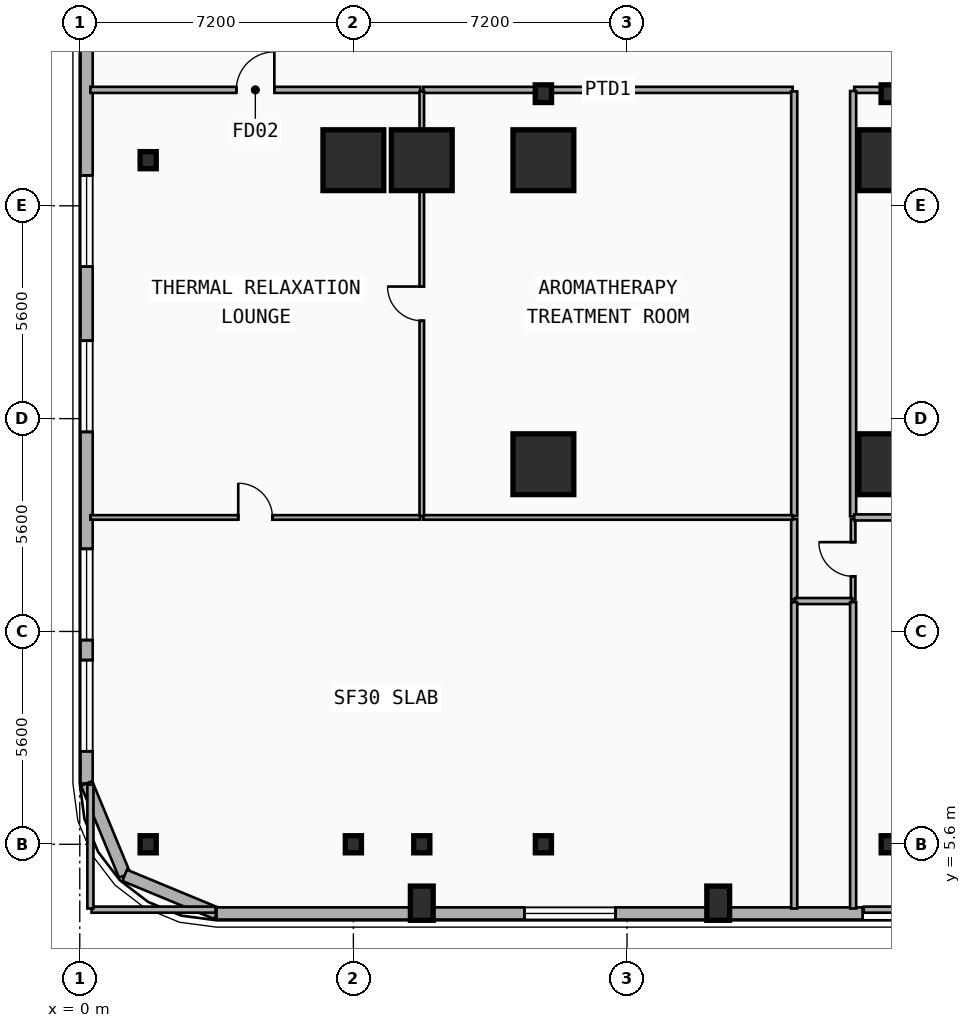
"""IFC4 building model, lengths in metres.
Left out: names, types, materials, properties, quantities, classifications, styles, units other than length and angle.
Written with IfcOpenShell. Run it as: python <this file> out.ifc"""

import sys

from ifc_helpers import new_model, si_unit, direction, frame, frame_2d, origin, origin_2d, place, context, subcontext, project, spatial, rectangle, i_section, extrude, element, fill, save


model = new_model("IFC4")
c1 = context("Model", 3, precision=1e-05, world=origin(), true_north=direction((0.0, 1.0)))
c2 = subcontext(c1, "Body", "Model", "MODEL_VIEW")
j1 = project(units=[si_unit("LENGTHUNIT", "METRE"), si_unit("PLANEANGLEUNIT", "RADIAN")], contexts=[c1])
p1 = place(None, origin())
s1 = spatial("IfcSite", under=j1, at=p1, CompositionType="ELEMENT")
p2 = place(p1, origin())
s2 = spatial("IfcBuilding", under=s1, at=p2, CompositionType="ELEMENT")
p3 = place(p2, frame((0.0, 0.0, 24.2)))
s3 = spatial("IfcBuildingStorey", under=s2, at=p3, CompositionType="ELEMENT", Elevation=24.2)
for number, where, z_axis, x_axis in (
    (1, (12.2, 25.35, 0.0), (0.0, 0.0, 1.0), (1.0, 0.0, 0.0)),
    (2, (21.3, 25.35, 0.0), (0.0, 0.0, 1.0), (1.0, 0.0, 0.0)),
):
    element("IfcColumn", number, at=place(p3, frame(where, z_axis=z_axis, x_axis=x_axis)), inside=s3, PredefinedType="COLUMN", context=c2, shape_type="SweptSolid", body=[
        extrude(i_section(OverallWidth=0.428, OverallDepth=0.465, WebThickness=0.045, FlangeThickness=0.073, FilletRadius=0.015, at=origin_2d()), origin(), (0.0, 0.0, 1.0), 4.8),
    ])
for number, where, z_axis, x_axis in (
    (3, (1.8, 5.6, 0.0), (0.0, 0.0, 1.0), (1.0, 0.0, 0.0)),
    (4, (1.8, 23.6, 0.0), (0.0, 0.0, 1.0), (1.0, 0.0, 0.0)),
    (5, (7.2, 5.6, 0.0), (0.0, 0.0, 1.0), (1.0, 0.0, 0.0)),
):
    element("IfcColumn", number, at=place(p3, frame(where, z_axis=z_axis, x_axis=x_axis)), inside=s3, PredefinedType="COLUMN", context=c2, shape_type="SweptSolid", body=[
        extrude(i_section(OverallWidth=0.424, OverallDepth=0.45, WebThickness=0.041, FlangeThickness=0.065, FilletRadius=0.015, at=origin_2d()), origin(), (0.0, 0.0, 1.0), 4.8),
    ])
p4 = place(p3, frame((7.2, 23.6, 0.0), z_axis=(0.0, 0.0, 1.0), x_axis=(1.0, 0.0, 0.0)))
e6 = element("IfcColumn", 6, at=p4, inside=s3, PredefinedType="COLUMN", context=c2, shape_type="SweptSolid", body=[
    extrude(rectangle(XDim=1.6, YDim=1.6, at=origin_2d()), origin(), (0.0, 0.0, 1.0), 4.732),
])
p5 = place(p3, frame((9.0, 5.6, 0.0), z_axis=(0.0, 0.0, 1.0), x_axis=(1.0, 0.0, 0.0)))
e7 = element("IfcColumn", 7, at=p5, inside=s3, PredefinedType="COLUMN", context=c2, shape_type="SweptSolid", body=[
    extrude(i_section(OverallWidth=0.424, OverallDepth=0.45, WebThickness=0.041, FlangeThickness=0.065, FilletRadius=0.015, at=origin_2d()), origin(), (0.0, 0.0, 1.0), 4.8),
])
p6 = place(p3, frame((9.0, 23.6, 0.0), z_axis=(0.0, 0.0, 1.0), x_axis=(1.0, 0.0, 0.0)))
e8 = element("IfcColumn", 8, at=p6, inside=s3, PredefinedType="COLUMN", context=c2, shape_type="SweptSolid", body=[
    extrude(rectangle(XDim=1.6, YDim=1.6, at=origin_2d()), origin(), (0.0, 0.0, 1.0), 4.8),
])
p7 = place(p3, frame((12.2, 5.6, 0.0), z_axis=(0.0, 0.0, 1.0), x_axis=(1.0, 0.0, 0.0)))
e9 = element("IfcColumn", 9, at=p7, inside=s3, PredefinedType="COLUMN", context=c2, shape_type="SweptSolid", body=[
    extrude(i_section(OverallWidth=0.424, OverallDepth=0.45, WebThickness=0.041, FlangeThickness=0.065, FilletRadius=0.015, at=origin_2d()), origin(), (0.0, 0.0, 1.0), 4.8),
])
p8 = place(p3, frame((12.2, 15.6, 0.0), z_axis=(0.0, 0.0, 1.0), x_axis=(1.0, 0.0, 0.0)))
e10 = element("IfcColumn", 10, at=p8, inside=s3, PredefinedType="COLUMN", context=c2, shape_type="SweptSolid", body=[
    extrude(rectangle(XDim=1.6, YDim=1.6, at=origin_2d()), origin(), (0.0, 0.0, 1.0), 4.8),
])
p9 = place(p3, frame((12.2, 23.6, 0.0), z_axis=(0.0, 0.0, 1.0), x_axis=(1.0, 0.0, 0.0)))
e11 = element("IfcColumn", 11, at=p9, inside=s3, PredefinedType="COLUMN", context=c2, shape_type="SweptSolid", body=[
    extrude(rectangle(XDim=1.6, YDim=1.6, at=origin_2d()), origin(), (0.0, 0.0, 1.0), 4.732),
])
p10 = place(p3, frame((21.3, 5.6, 0.0), z_axis=(0.0, 0.0, 1.0), x_axis=(1.0, 0.0, 0.0)))
e12 = element("IfcColumn", 12, at=p10, inside=s3, PredefinedType="COLUMN", context=c2, shape_type="SweptSolid", body=[
    extrude(i_section(OverallWidth=0.424, OverallDepth=0.45, WebThickness=0.041, FlangeThickness=0.065, FilletRadius=0.015, at=origin_2d()), origin(), (0.0, 0.0, 1.0), 4.8),
])
p11 = place(p3, frame((21.3, 15.6, 0.0), z_axis=(0.0, 0.0, 1.0), x_axis=(1.0, 0.0, 0.0)))
e13 = element("IfcColumn", 13, at=p11, inside=s3, PredefinedType="COLUMN", context=c2, shape_type="SweptSolid", body=[
    extrude(rectangle(XDim=1.6, YDim=1.6, at=origin_2d()), origin(), (0.0, 0.0, 1.0), 4.8),
])
p12 = place(p3, frame((21.3, 23.6, 0.0), z_axis=(0.0, 0.0, 1.0), x_axis=(1.0, 0.0, 0.0)))
e14 = element("IfcColumn", 14, at=p12, inside=s3, PredefinedType="COLUMN", context=c2, shape_type="SweptSolid", body=[
    extrude(rectangle(XDim=1.6, YDim=1.6, at=origin_2d()), origin(), (0.0, 0.0, 1.0), 4.732),
])
for number, where, z_axis, x_axis in (
    (15, (9.0, 4.05, 0.0), (0.0, 0.0, 1.0), (1.0, 0.0, 0.0)),
    (16, (16.8, 4.05, 0.0), (0.0, 0.0, 1.0), (1.0, 0.0, 0.0)),
):
    element("IfcColumn", number, at=place(p3, frame(where, z_axis=z_axis, x_axis=x_axis)), inside=s3, PredefinedType="PILASTER", context=c2, shape_type="SweptSolid", body=[
        extrude(rectangle(XDim=0.6, YDim=0.9, at=origin_2d()), origin(), (0.0, 0.0, 1.0), 4.8),
    ])
p13 = place(p3, frame((0.18, 7.2, 0.0), z_axis=(0.0, 0.0, 1.0), x_axis=(0.0, 1.0, 0.0)))
e17 = element("IfcWall", 17, at=p13, inside=s3, PredefinedType="SOLIDWALL", context=c2, shape_type="SweptSolid", body=[
    extrude(rectangle(XDim=34.4, YDim=0.32, at=frame_2d((17.2, 0.0))), origin(), (0.0, 0.0, 1.0), 4.48),
])
p14 = place(p13, frame((22.35, 0.0, 0.9)))
e18 = element("IfcOpeningElement", 18, at=p14, cuts=e17, PredefinedType="OPENING", context=c2, shape_type="SweptSolid", body=[
    extrude(rectangle(XDim=2.4, YDim=1.8, at=frame_2d((1.2, 0.9))), frame((0.0, 0.17, 0.0), z_axis=(0.0, -1.0, 0.0), x_axis=(1.0, 0.0, 0.0)), (0.0, 0.0, 1.0), 0.34),
])
p15 = place(p13, frame((26.4, 0.0, 0.9)))
e19 = element("IfcOpeningElement", 19, at=p15, cuts=e17, PredefinedType="OPENING", context=c2, shape_type="SweptSolid", body=[
    extrude(rectangle(XDim=2.4, YDim=1.8, at=frame_2d((1.2, 0.9))), frame((0.0, 0.17, 0.0), z_axis=(0.0, -1.0, 0.0), x_axis=(1.0, 0.0, 0.0)), (0.0, 0.0, 1.0), 0.34),
])
p16 = place(p13, frame((0.847, 0.0, 0.9)))
e20 = element("IfcOpeningElement", 20, at=p16, cuts=e17, PredefinedType="OPENING", context=c2, shape_type="SweptSolid", body=[
    extrude(rectangle(XDim=2.4, YDim=1.8, at=frame_2d((1.2, 0.9))), frame((0.0, 0.17, 0.0), z_axis=(0.0, -1.0, 0.0), x_axis=(1.0, 0.0, 0.0)), (0.0, 0.0, 1.0), 0.34),
])
p17 = place(p13, frame((3.773, 0.0, 0.9)))
e21 = element("IfcOpeningElement", 21, at=p17, cuts=e17, PredefinedType="OPENING", context=c2, shape_type="SweptSolid", body=[
    extrude(rectangle(XDim=2.4, YDim=1.8, at=frame_2d((1.2, 0.9))), frame((0.0, 0.17, 0.0), z_axis=(0.0, -1.0, 0.0), x_axis=(1.0, 0.0, 0.0)), (0.0, 0.0, 1.0), 0.34),
])
p18 = place(p13, frame((9.25, 0.0, 0.9)))
e22 = element("IfcOpeningElement", 22, at=p18, cuts=e17, PredefinedType="OPENING", context=c2, shape_type="SweptSolid", body=[
    extrude(rectangle(XDim=2.4, YDim=1.8, at=frame_2d((1.2, 0.9))), frame((0.0, 0.17, 0.0), z_axis=(0.0, -1.0, 0.0), x_axis=(1.0, 0.0, 0.0)), (0.0, 0.0, 1.0), 0.34),
])
p19 = place(p13, frame((13.6, 0.0, 0.9)))
e23 = element("IfcOpeningElement", 23, at=p19, cuts=e17, PredefinedType="OPENING", context=c2, shape_type="SweptSolid", body=[
    extrude(rectangle(XDim=2.4, YDim=1.8, at=frame_2d((1.2, 0.9))), frame((0.0, 0.17, 0.0), z_axis=(0.0, -1.0, 0.0), x_axis=(1.0, 0.0, 0.0)), (0.0, 0.0, 1.0), 0.34),
])
p20 = place(p3, frame((1.182, 4.782, 0.0), z_axis=(0.0, 0.0, 1.0), x_axis=(-0.382700522567, 0.923872453333, 0.0)))
e24 = element("IfcWall", 24, at=p20, inside=s3, PredefinedType="SOLIDWALL", context=c2, shape_type="SweptSolid", body=[
    extrude(rectangle(XDim=2.617, YDim=0.32, at=frame_2d((1.309, 0.0))), origin(), (0.0, 0.0, 1.0), 4.48),
])
p21 = place(p3, frame((3.6, 3.78, 0.0), z_axis=(0.0, 0.0, 1.0), x_axis=(-0.923886112352, 0.382667546838, 0.0)))
e25 = element("IfcWall", 25, at=p21, inside=s3, PredefinedType="SOLIDWALL", context=c2, shape_type="SweptSolid", body=[
    extrude(rectangle(XDim=2.618, YDim=0.32, at=frame_2d((1.309, 0.0))), origin(), (0.0, 0.0, 1.0), 4.48),
])
p22 = place(p3, frame((20.6, 3.78, 0.0), z_axis=(0.0, 0.0, 1.0), x_axis=(-1.0, 0.0, 0.0)))
e26 = element("IfcWall", 26, at=p22, inside=s3, PredefinedType="SOLIDWALL", context=c2, shape_type="SweptSolid", body=[
    extrude(rectangle(XDim=17.0, YDim=0.32, at=frame_2d((8.5, 0.0))), origin(), (0.0, 0.0, 1.0), 4.48),
])
p23 = place(p22, frame((6.5, 0.0, 0.9)))
e27 = element("IfcOpeningElement", 27, at=p23, cuts=e26, PredefinedType="OPENING", context=c2, shape_type="SweptSolid", body=[
    extrude(rectangle(XDim=2.4, YDim=1.8, at=frame_2d((1.2, 0.9))), frame((0.0, 0.17, 0.0), z_axis=(0.0, -1.0, 0.0), x_axis=(1.0, 0.0, 0.0)), (0.0, 0.0, 1.0), 0.34),
])
p24 = place(p3, frame((0.28, 25.45, 0.0), z_axis=(0.0, 0.0, 1.0), x_axis=(1.0, 0.0, 0.0)))
e28 = element("IfcWall", 28, at=p24, inside=s3, PredefinedType="PARTITIONING", context=c2, shape_type="SweptSolid", body=[
    extrude(rectangle(XDim=8.68, YDim=0.16, at=frame_2d((4.34, 0.0))), origin(), (0.0, 0.0, 1.0), 4.48),
])
p25 = place(p24, frame((3.84, 0.0, 0.0)))
e29 = element("IfcOpeningElement", 29, at=p25, cuts=e28, PredefinedType="OPENING", context=c2, shape_type="SweptSolid", body=[
    extrude(rectangle(XDim=1.0, YDim=2.15, at=frame_2d((0.5, 1.075))), frame((0.0, 0.09, 0.0), z_axis=(0.0, -1.0, 0.0), x_axis=(1.0, 0.0, 0.0)), (0.0, 0.0, 1.0), 0.18),
])
p26 = place(p3, frame((9.04, 25.45, 0.0), z_axis=(0.0, 0.0, 1.0), x_axis=(1.0, 0.0, 0.0)))
e30 = element("IfcWall", 30, at=p26, inside=s3, PredefinedType="PARTITIONING", context=c2, shape_type="SweptSolid", body=[
    extrude(rectangle(XDim=9.72, YDim=0.16, at=frame_2d((4.86, 0.0))), origin(), (0.0, 0.0, 1.0), 3.452),
])
p27 = place(p3, frame((18.8, 12.04, 0.0), z_axis=(0.0, 0.0, 1.0), x_axis=(0.0, 1.0, 0.0)))
e31 = element("IfcWall", 31, at=p27, inside=s3, PredefinedType="PARTITIONING", context=c2, shape_type="SweptSolid", body=[
    extrude(rectangle(XDim=2.12, YDim=0.16, at=frame_2d((1.06, 0.0))), origin(), (0.0, 0.0, 1.0), 4.1),
])
p28 = place(p3, frame((18.8, 14.24, 0.0), z_axis=(0.0, 0.0, 1.0), x_axis=(0.0, 1.0, 0.0)))
e32 = element("IfcWall", 32, at=p28, inside=s3, PredefinedType="PARTITIONING", context=c2, shape_type="SweptSolid", body=[
    extrude(rectangle(XDim=11.17, YDim=0.16, at=frame_2d((5.585, 0.0))), origin(), (0.0, 0.0, 1.0), 3.452),
])
p29 = place(p3, frame((20.35, 12.04, 0.0), z_axis=(0.0, 0.0, 1.0), x_axis=(0.0, 1.0, 0.0)))
e33 = element("IfcWall", 33, at=p29, inside=s3, PredefinedType="PARTITIONING", context=c2, shape_type="SweptSolid", body=[
    extrude(rectangle(XDim=2.12, YDim=0.12, at=frame_2d((1.06, 0.0))), origin(), (0.0, 0.0, 1.0), 4.1),
])
p30 = place(p29, frame((0.61, 0.0, 0.0)))
e34 = element("IfcOpeningElement", 34, at=p30, cuts=e33, PredefinedType="OPENING", context=c2, shape_type="SweptSolid", body=[
    extrude(rectangle(XDim=0.9, YDim=2.1, at=frame_2d((0.45, 1.05))), frame((0.0, 0.07, 0.0), z_axis=(0.0, -1.0, 0.0), x_axis=(1.0, 0.0, 0.0)), (0.0, 0.0, 1.0), 0.14),
])
p31 = place(p3, frame((0.28, 14.2, 0.0), z_axis=(0.0, 0.0, 1.0), x_axis=(1.0, 0.0, 0.0)))
e35 = element("IfcWall", 35, at=p31, inside=s3, PredefinedType="PARTITIONING", context=c2, shape_type="SweptSolid", body=[
    extrude(rectangle(XDim=8.68, YDim=0.12, at=frame_2d((4.34, 0.0))), origin(), (0.0, 0.0, 1.0), 4.48),
])
p32 = place(p31, frame((3.89, 0.0, 0.0)))
e36 = element("IfcOpeningElement", 36, at=p32, cuts=e35, PredefinedType="OPENING", context=c2, shape_type="SweptSolid", body=[
    extrude(rectangle(XDim=0.9, YDim=2.1, at=frame_2d((0.45, 1.05))), frame((0.0, 0.07, 0.0), z_axis=(0.0, -1.0, 0.0), x_axis=(1.0, 0.0, 0.0)), (0.0, 0.0, 1.0), 0.14),
])
p33 = place(p3, frame((9.04, 14.2, 0.0), z_axis=(0.0, 0.0, 1.0), x_axis=(1.0, 0.0, 0.0)))
e37 = element("IfcWall", 37, at=p33, inside=s3, PredefinedType="PARTITIONING", context=c2, shape_type="SweptSolid", body=[
    extrude(rectangle(XDim=9.72, YDim=0.12, at=frame_2d((4.86, 0.0))), origin(), (0.0, 0.0, 1.0), 3.452),
])
p34 = place(p3, frame((9.0, 14.24, 0.0), z_axis=(0.0, 0.0, 1.0), x_axis=(0.0, 1.0, 0.0)))
e38 = element("IfcWall", 38, at=p34, inside=s3, PredefinedType="PARTITIONING", context=c2, shape_type="SweptSolid", body=[
    extrude(rectangle(XDim=11.17, YDim=0.12, at=frame_2d((5.585, 0.0))), origin(), (0.0, 0.0, 1.0), 3.81),
])
p35 = place(p34, frame((5.135, 0.0, 0.0)))
e39 = element("IfcOpeningElement", 39, at=p35, cuts=e38, PredefinedType="OPENING", context=c2, shape_type="SweptSolid", body=[
    extrude(rectangle(XDim=0.9, YDim=2.1, at=frame_2d((0.45, 1.05))), frame((0.0, 0.07, 0.0), z_axis=(0.0, -1.0, 0.0), x_axis=(1.0, 0.0, 0.0)), (0.0, 0.0, 1.0), 0.14),
])
p36 = place(p3, frame((20.38, 25.45, 0.0), z_axis=(0.0, 0.0, 1.0), x_axis=(1.0, 0.0, 0.0)))
e40 = element("IfcWall", 40, at=p36, inside=s3, PredefinedType="PARTITIONING", context=c2, shape_type="SweptSolid", body=[
    extrude(rectangle(XDim=15.94, YDim=0.16, at=frame_2d((7.97, 0.0))), origin(), (0.0, 0.0, 1.0), 3.452),
])
p37 = place(p3, frame((18.83, 12.0, 0.0), z_axis=(0.0, 0.0, 1.0), x_axis=(1.0, 0.0, 0.0)))
e41 = element("IfcWall", 41, at=p37, inside=s3, PredefinedType="PARTITIONING", context=c2, shape_type="SweptSolid", body=[
    extrude(rectangle(XDim=1.49, YDim=0.16, at=frame_2d((0.745, 0.0))), origin(), (0.0, 0.0, 1.0), 4.1),
])
p38 = place(p3, frame((20.35, 14.23, 0.0), z_axis=(0.0, 0.0, 1.0), x_axis=(0.0, 1.0, 0.0)))
e42 = element("IfcWall", 42, at=p38, inside=s3, PredefinedType="PARTITIONING", context=c2, shape_type="SweptSolid", body=[
    extrude(rectangle(XDim=11.19, YDim=0.16, at=frame_2d((5.595, 0.0))), origin(), (0.0, 0.0, 1.0), 3.452),
])
for number, where, z_axis, x_axis in (
    (43, (0.31, 3.88, 0.0), (0.0, 0.0, 1.0), (1.0, 0.0, 0.0)),
    (44, (0.28, 3.91, 0.0), (0.0, 0.0, 1.0), (0.0, 1.0, 0.0)),
):
    element("IfcWall", number, at=place(p3, frame(where, z_axis=z_axis, x_axis=x_axis)), inside=s3, PredefinedType="PARTITIONING", context=c2, shape_type="SweptSolid", body=[
        extrude(rectangle(XDim=3.26, YDim=0.16, at=frame_2d((1.63, 0.0))), origin(), (0.0, 0.0, 1.0), 4.48),
    ])
p39 = place(p3, frame((18.8, 3.91, 0.0), z_axis=(0.0, 0.0, 1.0), x_axis=(0.0, 1.0, 0.0)))
e45 = element("IfcWall", 45, at=p39, inside=s3, PredefinedType="PARTITIONING", context=c2, shape_type="SweptSolid", body=[
    extrude(rectangle(XDim=8.06, YDim=0.16, at=frame_2d((4.03, 0.0))), origin(), (0.0, 0.0, 1.0), 3.81),
])
p40 = place(p3, frame((20.63, 3.88, 0.0), z_axis=(0.0, 0.0, 1.0), x_axis=(1.0, 0.0, 0.0)))
e46 = element("IfcWall", 46, at=p40, inside=s3, PredefinedType="PARTITIONING", context=c2, shape_type="SweptSolid", body=[
    extrude(rectangle(XDim=1.44, YDim=0.16, at=frame_2d((0.72, 0.0))), origin(), (0.0, 0.0, 1.0), 4.48),
])
p41 = place(p3, frame((20.38, 14.2, 0.0), z_axis=(0.0, 0.0, 1.0), x_axis=(1.0, 0.0, 0.0)))
e47 = element("IfcWall", 47, at=p41, inside=s3, PredefinedType="PARTITIONING", context=c2, shape_type="SweptSolid", body=[
    extrude(rectangle(XDim=15.94, YDim=0.16, at=frame_2d((7.97, 0.0))), origin(), (0.0, 0.0, 1.0), 3.452),
])
p42 = place(p3, frame((20.35, 3.91, 0.0), z_axis=(0.0, 0.0, 1.0), x_axis=(0.0, 1.0, 0.0)))
e48 = element("IfcWall", 48, at=p42, inside=s3, PredefinedType="PARTITIONING", context=c2, shape_type="SweptSolid", body=[
    extrude(rectangle(XDim=8.06, YDim=0.16, at=frame_2d((4.03, 0.0))), origin(), (0.0, 0.0, 1.0), 3.81),
])
p43 = place(p16, origin())
e49 = element("IfcWindow", 49, at=p43, inside=s3, PartitioningType="SINGLE_PANEL", PredefinedType="WINDOW", context=c2, shape_type="SweptSolid", body=[
    extrude(rectangle(XDim=2.4, YDim=1.8, at=frame_2d((1.2, 0.9))), frame((0.0, 0.03, 0.0), z_axis=(0.0, -1.0, 0.0), x_axis=(1.0, 0.0, 0.0)), (0.0, 0.0, 1.0), 0.06),
])
fill(e20, e49)
p44 = place(p17, origin())
e50 = element("IfcWindow", 50, at=p44, inside=s3, PartitioningType="SINGLE_PANEL", PredefinedType="WINDOW", context=c2, shape_type="SweptSolid", body=[
    extrude(rectangle(XDim=2.4, YDim=1.8, at=frame_2d((1.2, 0.9))), frame((0.0, 0.03, 0.0), z_axis=(0.0, -1.0, 0.0), x_axis=(1.0, 0.0, 0.0)), (0.0, 0.0, 1.0), 0.06),
])
fill(e21, e50)
p45 = place(p18, origin())
e51 = element("IfcWindow", 51, at=p45, inside=s3, PartitioningType="SINGLE_PANEL", PredefinedType="WINDOW", context=c2, shape_type="SweptSolid", body=[
    extrude(rectangle(XDim=2.4, YDim=1.8, at=frame_2d((1.2, 0.9))), frame((0.0, 0.03, 0.0), z_axis=(0.0, -1.0, 0.0), x_axis=(1.0, 0.0, 0.0)), (0.0, 0.0, 1.0), 0.06),
])
fill(e22, e51)
p46 = place(p19, origin())
e52 = element("IfcWindow", 52, at=p46, inside=s3, PartitioningType="SINGLE_PANEL", PredefinedType="WINDOW", context=c2, shape_type="SweptSolid", body=[
    extrude(rectangle(XDim=2.4, YDim=1.8, at=frame_2d((1.2, 0.9))), frame((0.0, 0.03, 0.0), z_axis=(0.0, -1.0, 0.0), x_axis=(1.0, 0.0, 0.0)), (0.0, 0.0, 1.0), 0.06),
])
fill(e23, e52)
p47 = place(p23, origin())
e53 = element("IfcWindow", 53, at=p47, inside=s3, PartitioningType="SINGLE_PANEL", PredefinedType="WINDOW", context=c2, shape_type="SweptSolid", body=[
    extrude(rectangle(XDim=2.4, YDim=1.8, at=frame_2d((1.2, 0.9))), frame((0.0, 0.03, 0.0), z_axis=(0.0, -1.0, 0.0), x_axis=(1.0, 0.0, 0.0)), (0.0, 0.0, 1.0), 0.06),
])
fill(e27, e53)
p48 = place(p25, origin())
e54 = element("IfcDoor", 54, at=p48, inside=s3, OperationType="SINGLE_SWING_RIGHT", PredefinedType="DOOR", context=c2, shape_type="SweptSolid", body=[
    extrude(rectangle(XDim=1.0, YDim=2.15, at=frame_2d((0.5, 1.075))), frame((0.0, 0.025, 0.0), z_axis=(0.0, -1.0, 0.0), x_axis=(1.0, 0.0, 0.0)), (0.0, 0.0, 1.0), 0.05),
])
fill(e29, e54)
p49 = place(p30, origin())
e55 = element("IfcDoor", 55, at=p49, inside=s3, OperationType="SINGLE_SWING_RIGHT", PredefinedType="DOOR", context=c2, shape_type="SweptSolid", body=[
    extrude(rectangle(XDim=0.9, YDim=2.1, at=frame_2d((0.45, 1.05))), frame((0.0, 0.025, 0.0), z_axis=(0.0, -1.0, 0.0), x_axis=(1.0, 0.0, 0.0)), (0.0, 0.0, 1.0), 0.05),
])
fill(e34, e55)
p50 = place(p32, origin())
e56 = element("IfcDoor", 56, at=p50, inside=s3, OperationType="SINGLE_SWING_LEFT", PredefinedType="DOOR", context=c2, shape_type="SweptSolid", body=[
    extrude(rectangle(XDim=0.9, YDim=2.1, at=frame_2d((0.45, 1.05))), frame((0.0, 0.025, 0.0), z_axis=(0.0, -1.0, 0.0), x_axis=(1.0, 0.0, 0.0)), (0.0, 0.0, 1.0), 0.05),
])
fill(e36, e56)
p51 = place(p35, origin())
e57 = element("IfcDoor", 57, at=p51, inside=s3, OperationType="SINGLE_SWING_RIGHT", PredefinedType="DOOR", context=c2, shape_type="SweptSolid", body=[
    extrude(rectangle(XDim=0.9, YDim=2.1, at=frame_2d((0.45, 1.05))), frame((0.0, 0.025, 0.0), z_axis=(0.0, -1.0, 0.0), x_axis=(1.0, 0.0, 0.0)), (0.0, 0.0, 1.0), 0.05),
])
fill(e39, e57)
save(model, sys.argv[1])
